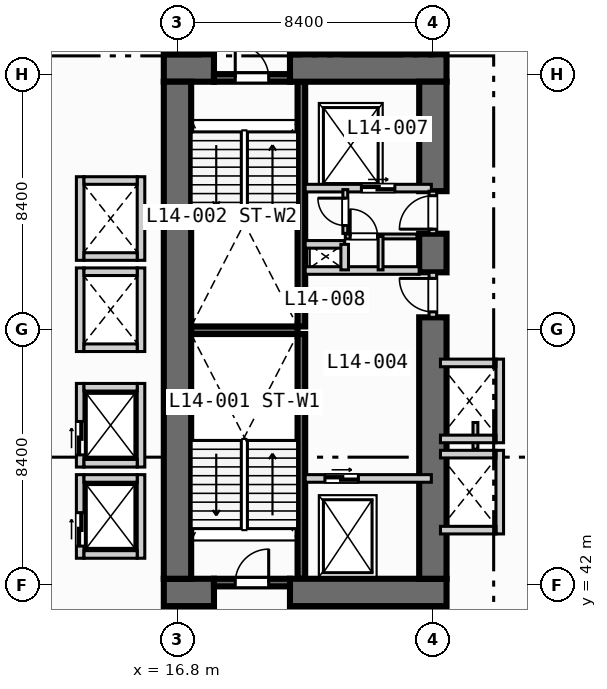
"""IFC4 building model, lengths in metres.
Left out: names, types, materials, properties, quantities, classifications, styles, units other than length and angle.
Written with IfcOpenShell. Run it as: python <this file> out.ifc"""

import sys

from ifc_helpers import new_model, si_unit, direction, frame, frame_2d, origin, place, context, subcontext, project, spatial, rectangle, extrude, element, fill, save


model = new_model("IFC4")
c1 = context("Model", 3, precision=1e-05, world=origin(), true_north=direction((0.0, 1.0)))
c2 = subcontext(c1, "Body", "Model", "MODEL_VIEW")
j1 = project(units=[si_unit("LENGTHUNIT", "METRE"), si_unit("PLANEANGLEUNIT", "RADIAN")], contexts=[c1])
p1 = place(None, origin())
s1 = spatial("IfcSite", under=j1, at=p1, CompositionType="ELEMENT")
p2 = place(p1, origin())
s2 = spatial("IfcBuilding", under=s1, at=p2, CompositionType="ELEMENT")
p3 = place(p2, frame((0.0, 0.0, 62.4)))
s3 = spatial("IfcBuildingStorey", under=s2, at=p3, CompositionType="ELEMENT", Elevation=62.4)
for number, where, z_axis, x_axis in (
    (1, (20.875, 42.2, 0.0), (0.0, 0.0, 1.0), (0.0, 1.0, 0.0)),
    (2, (20.875, 50.5, 0.0), (0.0, 0.0, 1.0), (0.0, 1.0, 0.0)),
):
    element("IfcWall", number, at=place(p3, frame(where, z_axis=z_axis, x_axis=x_axis)), inside=s3, PredefinedType="SOLIDWALL", context=c2, shape_type="SweptSolid", body=[
        extrude(rectangle(XDim=8.05, YDim=0.25, at=frame_2d((4.025, 0.0))), origin(), (0.0, 0.0, 1.0), 3.55),
    ])
p4 = place(p3, frame((17.25, 50.375, 0.0), z_axis=(0.0, 0.0, 1.0), x_axis=(1.0, 0.0, 0.0)))
e3 = element("IfcWall", 3, at=p4, inside=s3, PredefinedType="SOLIDWALL", context=c2, shape_type="SweptSolid", body=[
    extrude(rectangle(XDim=3.5, YDim=0.25, at=frame_2d((1.75, 0.0))), origin(), (0.0, 0.0, 1.0), 3.55),
])
p5 = place(p3, frame((16.35, 41.75, 0.0), z_axis=(0.0, 0.0, 1.0), x_axis=(1.0, 0.0, 0.0)))
e4 = element("IfcWall", 4, at=p5, inside=s3, PredefinedType="SHEAR", context=c2, shape_type="SweptSolid", body=[
    extrude(rectangle(XDim=1.65, YDim=0.9, at=frame_2d((0.825, 0.0))), origin(), (0.0, 0.0, 1.0), 3.55),
])
p6 = place(p3, frame((20.5, 41.75, 0.0), z_axis=(0.0, 0.0, 1.0), x_axis=(1.0, 0.0, 0.0)))
e5 = element("IfcWall", 5, at=p6, inside=s3, PredefinedType="SHEAR", context=c2, shape_type="SweptSolid", body=[
    extrude(rectangle(XDim=5.15, YDim=0.9, at=frame_2d((2.575, 0.0))), origin(), (0.0, 0.0, 1.0), 3.55),
])
p7 = place(p3, frame((16.35, 59.0, 0.0), z_axis=(0.0, 0.0, 1.0), x_axis=(1.0, 0.0, 0.0)))
e6 = element("IfcWall", 6, at=p7, inside=s3, PredefinedType="SHEAR", context=c2, shape_type="SweptSolid", body=[
    extrude(rectangle(XDim=1.65, YDim=0.9, at=frame_2d((0.825, 0.0))), origin(), (0.0, 0.0, 1.0), 3.55),
])
p8 = place(p3, frame((20.5, 59.0, 0.0), z_axis=(0.0, 0.0, 1.0), x_axis=(1.0, 0.0, 0.0)))
e7 = element("IfcWall", 7, at=p8, inside=s3, PredefinedType="SHEAR", context=c2, shape_type="SweptSolid", body=[
    extrude(rectangle(XDim=5.15, YDim=0.9, at=frame_2d((2.575, 0.0))), origin(), (0.0, 0.0, 1.0), 3.55),
])
p9 = place(p3, frame((16.8, 42.2, 0.0), z_axis=(0.0, 0.0, 1.0), x_axis=(0.0, 1.0, 0.0)))
e8 = element("IfcWall", 8, at=p9, inside=s3, PredefinedType="SHEAR", context=c2, shape_type="SweptSolid", body=[
    extrude(rectangle(XDim=16.35, YDim=0.9, at=frame_2d((8.175, 0.0))), origin(), (0.0, 0.0, 1.0), 3.55),
])
p10 = place(p3, frame((25.2, 42.2, 0.0), z_axis=(0.0, 0.0, 1.0), x_axis=(0.0, 1.0, 0.0)))
e9 = element("IfcWall", 9, at=p10, inside=s3, PredefinedType="SHEAR", context=c2, shape_type="SweptSolid", body=[
    extrude(rectangle(XDim=8.6, YDim=0.9, at=frame_2d((4.3, 0.0))), origin(), (0.0, 0.0, 1.0), 3.55),
])
p11 = place(p3, frame((25.2, 52.28, 0.0), z_axis=(0.0, 0.0, 1.0), x_axis=(0.0, 1.0, 0.0)))
e10 = element("IfcWall", 10, at=p11, inside=s3, PredefinedType="SHEAR", context=c2, shape_type="SweptSolid", body=[
    extrude(rectangle(XDim=1.27, YDim=0.9, at=frame_2d((0.635, 0.0))), origin(), (0.0, 0.0, 1.0), 3.55),
])
p12 = place(p3, frame((25.2, 54.95, 0.0), z_axis=(0.0, 0.0, 1.0), x_axis=(0.0, 1.0, 0.0)))
e11 = element("IfcWall", 11, at=p12, inside=s3, PredefinedType="SHEAR", context=c2, shape_type="SweptSolid", body=[
    extrude(rectangle(XDim=3.6, YDim=0.9, at=frame_2d((1.8, 0.0))), origin(), (0.0, 0.0, 1.0), 3.55),
])
p13 = place(p3, frame((18.0, 42.075, 0.0), z_axis=(0.0, 0.0, 1.0), x_axis=(1.0, 0.0, 0.0)))
e12 = element("IfcWall", 12, at=p13, inside=s3, PredefinedType="SOLIDWALL", context=c2, shape_type="SweptSolid", body=[
    extrude(rectangle(XDim=2.5, YDim=0.25, at=frame_2d((1.25, 0.0))), origin(), (0.0, 0.0, 1.0), 3.55),
])
p14 = place(p13, frame((0.7, 0.0, 0.0)))
e13 = element("IfcOpeningElement", 13, at=p14, cuts=e12, PredefinedType="OPENING", context=c2, shape_type="SweptSolid", body=[
    extrude(rectangle(XDim=1.1, YDim=2.15, at=frame_2d((0.55, 1.075))), frame((0.0, 0.135, 0.0), z_axis=(0.0, -1.0, 0.0), x_axis=(1.0, 0.0, 0.0)), (0.0, 0.0, 1.0), 0.27),
])
p15 = place(p3, frame((18.0, 58.675, 0.0), z_axis=(0.0, 0.0, 1.0), x_axis=(1.0, 0.0, 0.0)))
e14 = element("IfcWall", 14, at=p15, inside=s3, PredefinedType="SOLIDWALL", context=c2, shape_type="SweptSolid", body=[
    extrude(rectangle(XDim=2.5, YDim=0.25, at=frame_2d((1.25, 0.0))), origin(), (0.0, 0.0, 1.0), 3.55),
])
p16 = place(p15, frame((0.7, 0.0, 0.0)))
e15 = element("IfcOpeningElement", 15, at=p16, cuts=e14, PredefinedType="OPENING", context=c2, shape_type="SweptSolid", body=[
    extrude(rectangle(XDim=1.1, YDim=2.15, at=frame_2d((0.55, 1.075))), frame((0.0, 0.135, 0.0), z_axis=(0.0, -1.0, 0.0), x_axis=(1.0, 0.0, 0.0)), (0.0, 0.0, 1.0), 0.27),
])
p17 = place(p3, frame((21.0, 45.5, 0.0), z_axis=(0.0, 0.0, 1.0), x_axis=(1.0, 0.0, 0.0)))
e16 = element("IfcWall", 16, at=p17, inside=s3, PredefinedType="SOLIDWALL", context=c2, shape_type="SweptSolid", body=[
    extrude(rectangle(XDim=4.15, YDim=0.25, at=frame_2d((2.075, 0.0))), origin(), (0.0, 0.0, 1.0), 3.55),
])
p18 = place(p17, frame((0.65, 0.0, 0.0)))
e17 = element("IfcOpeningElement", 17, at=p18, cuts=e16, PredefinedType="OPENING", context=c2, shape_type="SweptSolid", body=[
    extrude(rectangle(XDim=1.1, YDim=2.15, at=frame_2d((0.55, 1.075))), frame((0.0, 0.135, 0.0), z_axis=(0.0, -1.0, 0.0), x_axis=(1.0, 0.0, 0.0)), (0.0, 0.0, 1.0), 0.27),
])
p19 = place(p3, frame((25.2, 50.8, 0.0), z_axis=(0.0, 0.0, 1.0), x_axis=(0.0, 1.0, 0.0)))
e18 = element("IfcWall", 18, at=p19, inside=s3, PredefinedType="SOLIDWALL", context=c2, shape_type="SweptSolid", body=[
    extrude(rectangle(XDim=1.48, YDim=0.25, at=frame_2d((0.74, 0.0))), origin(), (0.0, 0.0, 1.0), 3.55),
])
p20 = place(p19, frame((0.18, 0.0, 0.0)))
e19 = element("IfcOpeningElement", 19, at=p20, cuts=e18, PredefinedType="OPENING", context=c2, shape_type="SweptSolid", body=[
    extrude(rectangle(XDim=1.1, YDim=2.15, at=frame_2d((0.55, 1.075))), frame((0.0, 0.135, 0.0), z_axis=(0.0, -1.0, 0.0), x_axis=(1.0, 0.0, 0.0)), (0.0, 0.0, 1.0), 0.27),
])
p21 = place(p3, frame((21.0, 52.34, 0.0), z_axis=(0.0, 0.0, 1.0), x_axis=(1.0, 0.0, 0.0)))
e20 = element("IfcWall", 20, at=p21, inside=s3, PredefinedType="SOLIDWALL", context=c2, shape_type="SweptSolid", body=[
    extrude(rectangle(XDim=3.75, YDim=0.25, at=frame_2d((1.875, 0.0))), origin(), (0.0, 0.0, 1.0), 3.55),
])
p22 = place(p3, frame((21.0, 55.05, 0.0), z_axis=(0.0, 0.0, 1.0), x_axis=(1.0, 0.0, 0.0)))
e21 = element("IfcWall", 21, at=p22, inside=s3, PredefinedType="SOLIDWALL", context=c2, shape_type="SweptSolid", body=[
    extrude(rectangle(XDim=4.15, YDim=0.25, at=frame_2d((2.075, 0.0))), origin(), (0.0, 0.0, 1.0), 3.55),
])
p23 = place(p22, frame((1.85, 0.0, 0.0)))
e22 = element("IfcOpeningElement", 22, at=p23, cuts=e21, PredefinedType="OPENING", context=c2, shape_type="SweptSolid", body=[
    extrude(rectangle(XDim=1.1, YDim=2.15, at=frame_2d((0.55, 1.075))), frame((0.0, 0.135, 0.0), z_axis=(0.0, -1.0, 0.0), x_axis=(1.0, 0.0, 0.0)), (0.0, 0.0, 1.0), 0.27),
])
p24 = place(p3, frame((25.2, 53.55, 0.0), z_axis=(0.0, 0.0, 1.0), x_axis=(0.0, 1.0, 0.0)))
e23 = element("IfcWall", 23, at=p24, inside=s3, PredefinedType="SOLIDWALL", context=c2, shape_type="SweptSolid", body=[
    extrude(rectangle(XDim=1.4, YDim=0.25, at=frame_2d((0.7, 0.0))), origin(), (0.0, 0.0, 1.0), 3.55),
])
p25 = place(p24, frame((0.15, 0.0, 0.0)))
e24 = element("IfcOpeningElement", 24, at=p25, cuts=e23, PredefinedType="OPENING", context=c2, shape_type="SweptSolid", body=[
    extrude(rectangle(XDim=1.1, YDim=2.15, at=frame_2d((0.55, 1.075))), frame((0.0, 0.135, 0.0), z_axis=(0.0, -1.0, 0.0), x_axis=(1.0, 0.0, 0.0)), (0.0, 0.0, 1.0), 0.27),
])
p26 = place(p3, frame((21.0, 53.2, 0.0), z_axis=(0.0, 0.0, 1.0), x_axis=(1.0, 0.0, 0.0)))
e25 = element("IfcWall", 25, at=p26, inside=s3, PredefinedType="SOLIDWALL", context=c2, shape_type="SweptSolid", body=[
    extrude(rectangle(XDim=1.3, YDim=0.25, at=frame_2d((0.65, 0.0))), origin(), (0.0, 0.0, 1.0), 3.55),
])
p27 = place(p3, frame((22.3, 52.36, 0.0), z_axis=(0.0, 0.0, 1.0), x_axis=(0.0, 1.0, 0.0)))
e26 = element("IfcWall", 26, at=p27, inside=s3, PredefinedType="SOLIDWALL", context=c2, shape_type="SweptSolid", body=[
    extrude(rectangle(XDim=0.84, YDim=0.25, at=frame_2d((0.42, 0.0))), origin(), (0.0, 0.0, 1.0), 3.55),
])
p28 = place(p3, frame((22.32, 53.56, 0.0), z_axis=(0.0, 0.0, 1.0), x_axis=(0.0, 1.0, 0.0)))
e27 = element("IfcWall", 27, at=p28, inside=s3, PredefinedType="PARTITIONING", context=c2, shape_type="SweptSolid", body=[
    extrude(rectangle(XDim=1.44, YDim=0.16, at=frame_2d((0.72, 0.0))), origin(), (0.0, 0.0, 1.0), 3.55),
])
p29 = place(p28, frame((0.26, 0.0, 0.0)))
e28 = element("IfcOpeningElement", 28, at=p29, cuts=e27, PredefinedType="OPENING", context=c2, shape_type="SweptSolid", body=[
    extrude(rectangle(XDim=0.9, YDim=2.1, at=frame_2d((0.45, 1.05))), frame((0.0, 0.09, 0.0), z_axis=(0.0, -1.0, 0.0), x_axis=(1.0, 0.0, 0.0)), (0.0, 0.0, 1.0), 0.18),
])
p30 = place(p3, frame((22.32, 53.46, 0.0), z_axis=(0.0, 0.0, 1.0), x_axis=(1.0, 0.0, 0.0)))
e29 = element("IfcWall", 29, at=p30, inside=s3, PredefinedType="PARTITIONING", context=c2, shape_type="SweptSolid", body=[
    extrude(rectangle(XDim=2.36, YDim=0.16, at=frame_2d((1.18, 0.0))), origin(), (0.0, 0.0, 1.0), 3.55),
])
p31 = place(p30, frame((0.16, 0.0, 0.0)))
e30 = element("IfcOpeningElement", 30, at=p31, cuts=e29, PredefinedType="OPENING", context=c2, shape_type="SweptSolid", body=[
    extrude(rectangle(XDim=0.9, YDim=2.1, at=frame_2d((0.45, 1.05))), frame((0.0, 0.09, 0.0), z_axis=(0.0, -1.0, 0.0), x_axis=(1.0, 0.0, 0.0)), (0.0, 0.0, 1.0), 0.18),
])
p32 = place(p3, frame((23.48, 52.36, 0.0), z_axis=(0.0, 0.0, 1.0), x_axis=(0.0, 1.0, 0.0)))
e31 = element("IfcWall", 31, at=p32, inside=s3, PredefinedType="PARTITIONING", context=c2, shape_type="SweptSolid", body=[
    extrude(rectangle(XDim=1.1, YDim=0.16, at=frame_2d((0.55, 0.0))), origin(), (0.0, 0.0, 1.0), 3.55),
])
p33 = place(p3, frame((13.6, 42.875, 0.0), z_axis=(0.0, 0.0, 1.0), x_axis=(0.0, 1.0, 0.0)))
e32 = element("IfcWall", 32, at=p33, inside=s3, PredefinedType="SOLIDWALL", context=c2, shape_type="SweptSolid", body=[
    extrude(rectangle(XDim=2.75, YDim=0.25, at=frame_2d((1.375, 0.0))), origin(), (0.0, 0.0, 1.0), 3.55),
])
p34 = place(p33, frame((0.4, 0.0, 0.0)))
e33 = element("IfcOpeningElement", 33, at=p34, cuts=e32, PredefinedType="OPENING", context=c2, shape_type="SweptSolid", body=[
    extrude(rectangle(XDim=1.1, YDim=2.15, at=frame_2d((0.55, 1.075))), frame((0.0, 0.135, 0.0), z_axis=(0.0, -1.0, 0.0), x_axis=(1.0, 0.0, 0.0)), (0.0, 0.0, 1.0), 0.27),
])
p35 = place(p3, frame((15.6, 42.875, 0.0), z_axis=(0.0, 0.0, 1.0), x_axis=(0.0, 1.0, 0.0)))
e34 = element("IfcWall", 34, at=p35, inside=s3, PredefinedType="SOLIDWALL", context=c2, shape_type="SweptSolid", body=[
    extrude(rectangle(XDim=2.75, YDim=0.25, at=frame_2d((1.375, 0.0))), origin(), (0.0, 0.0, 1.0), 3.55),
])
for number, where, z_axis, x_axis in (
    (35, (13.725, 43.0, 0.0), (0.0, 0.0, 1.0), (1.0, 0.0, 0.0)),
    (36, (13.725, 45.5, 0.0), (0.0, 0.0, 1.0), (1.0, 0.0, 0.0)),
):
    element("IfcWall", number, at=place(p3, frame(where, z_axis=z_axis, x_axis=x_axis)), inside=s3, PredefinedType="SOLIDWALL", context=c2, shape_type="SweptSolid", body=[
        extrude(rectangle(XDim=1.75, YDim=0.25, at=frame_2d((0.875, 0.0))), origin(), (0.0, 0.0, 1.0), 3.55),
    ])
p36 = place(p3, frame((13.6, 45.875, 0.0), z_axis=(0.0, 0.0, 1.0), x_axis=(0.0, 1.0, 0.0)))
e37 = element("IfcWall", 37, at=p36, inside=s3, PredefinedType="SOLIDWALL", context=c2, shape_type="SweptSolid", body=[
    extrude(rectangle(XDim=2.75, YDim=0.25, at=frame_2d((1.375, 0.0))), origin(), (0.0, 0.0, 1.0), 3.55),
])
p37 = place(p36, frame((0.4, 0.0, 0.0)))
e38 = element("IfcOpeningElement", 38, at=p37, cuts=e37, PredefinedType="OPENING", context=c2, shape_type="SweptSolid", body=[
    extrude(rectangle(XDim=1.1, YDim=2.15, at=frame_2d((0.55, 1.075))), frame((0.0, 0.135, 0.0), z_axis=(0.0, -1.0, 0.0), x_axis=(1.0, 0.0, 0.0)), (0.0, 0.0, 1.0), 0.27),
])
p38 = place(p3, frame((15.6, 45.875, 0.0), z_axis=(0.0, 0.0, 1.0), x_axis=(0.0, 1.0, 0.0)))
e39 = element("IfcWall", 39, at=p38, inside=s3, PredefinedType="SOLIDWALL", context=c2, shape_type="SweptSolid", body=[
    extrude(rectangle(XDim=2.75, YDim=0.25, at=frame_2d((1.375, 0.0))), origin(), (0.0, 0.0, 1.0), 3.55),
])
for number, where, z_axis, x_axis in (
    (40, (13.725, 46.0, 0.0), (0.0, 0.0, 1.0), (1.0, 0.0, 0.0)),
    (41, (13.725, 48.5, 0.0), (0.0, 0.0, 1.0), (1.0, 0.0, 0.0)),
):
    element("IfcWall", number, at=place(p3, frame(where, z_axis=z_axis, x_axis=x_axis)), inside=s3, PredefinedType="SOLIDWALL", context=c2, shape_type="SweptSolid", body=[
        extrude(rectangle(XDim=1.75, YDim=0.25, at=frame_2d((0.875, 0.0))), origin(), (0.0, 0.0, 1.0), 3.55),
    ])
for number, where, z_axis, x_axis in (
    (42, (13.6, 49.675, 0.0), (0.0, 0.0, 1.0), (0.0, 1.0, 0.0)),
    (43, (15.6, 49.675, 0.0), (0.0, 0.0, 1.0), (0.0, 1.0, 0.0)),
):
    element("IfcWall", number, at=place(p3, frame(where, z_axis=z_axis, x_axis=x_axis)), inside=s3, PredefinedType="SOLIDWALL", context=c2, shape_type="SweptSolid", body=[
        extrude(rectangle(XDim=2.75, YDim=0.25, at=frame_2d((1.375, 0.0))), origin(), (0.0, 0.0, 1.0), 3.55),
    ])
for number, where, z_axis, x_axis in (
    (44, (13.725, 49.8, 0.0), (0.0, 0.0, 1.0), (1.0, 0.0, 0.0)),
    (45, (13.725, 52.3, 0.0), (0.0, 0.0, 1.0), (1.0, 0.0, 0.0)),
):
    element("IfcWall", number, at=place(p3, frame(where, z_axis=z_axis, x_axis=x_axis)), inside=s3, PredefinedType="SOLIDWALL", context=c2, shape_type="SweptSolid", body=[
        extrude(rectangle(XDim=1.75, YDim=0.25, at=frame_2d((0.875, 0.0))), origin(), (0.0, 0.0, 1.0), 3.55),
    ])
for number, where, z_axis, x_axis in (
    (46, (13.6, 52.675, 0.0), (0.0, 0.0, 1.0), (0.0, 1.0, 0.0)),
    (47, (15.6, 52.675, 0.0), (0.0, 0.0, 1.0), (0.0, 1.0, 0.0)),
):
    element("IfcWall", number, at=place(p3, frame(where, z_axis=z_axis, x_axis=x_axis)), inside=s3, PredefinedType="SOLIDWALL", context=c2, shape_type="SweptSolid", body=[
        extrude(rectangle(XDim=2.75, YDim=0.25, at=frame_2d((1.375, 0.0))), origin(), (0.0, 0.0, 1.0), 3.55),
    ])
for number, where, z_axis, x_axis in (
    (48, (13.725, 52.8, 0.0), (0.0, 0.0, 1.0), (1.0, 0.0, 0.0)),
    (49, (13.725, 55.3, 0.0), (0.0, 0.0, 1.0), (1.0, 0.0, 0.0)),
):
    element("IfcWall", number, at=place(p3, frame(where, z_axis=z_axis, x_axis=x_axis)), inside=s3, PredefinedType="SOLIDWALL", context=c2, shape_type="SweptSolid", body=[
        extrude(rectangle(XDim=1.75, YDim=0.25, at=frame_2d((0.875, 0.0))), origin(), (0.0, 0.0, 1.0), 3.55),
    ])
p39 = place(p3, frame((27.4, 43.675, 0.0), z_axis=(0.0, 0.0, 1.0), x_axis=(0.0, 1.0, 0.0)))
e50 = element("IfcWall", 50, at=p39, inside=s3, PredefinedType="SOLIDWALL", context=c2, shape_type="SweptSolid", body=[
    extrude(rectangle(XDim=2.75, YDim=0.25, at=frame_2d((1.375, 0.0))), origin(), (0.0, 0.0, 1.0), 3.55),
])
for number, where, z_axis, x_axis in (
    (51, (25.45, 43.8, 0.0), (0.0, 0.0, 1.0), (1.0, 0.0, 0.0)),
    (52, (25.45, 46.3, 0.0), (0.0, 0.0, 1.0), (1.0, 0.0, 0.0)),
):
    element("IfcWall", number, at=place(p3, frame(where, z_axis=z_axis, x_axis=x_axis)), inside=s3, PredefinedType="SOLIDWALL", context=c2, shape_type="SweptSolid", body=[
        extrude(rectangle(XDim=1.825, YDim=0.25, at=frame_2d((0.913, 0.0))), origin(), (0.0, 0.0, 1.0), 3.55),
    ])
p40 = place(p3, frame((26.6, 46.46, 0.0), z_axis=(0.0, 0.0, 1.0), x_axis=(0.0, 1.0, 0.0)))
e53 = element("IfcWall", 53, at=p40, inside=s3, PredefinedType="PARTITIONING", context=c2, shape_type="SweptSolid", body=[
    extrude(rectangle(XDim=0.88, YDim=0.16, at=frame_2d((0.44, 0.0))), origin(), (0.0, 0.0, 1.0), 3.55),
])
p41 = place(p3, frame((27.4, 46.675, 0.0), z_axis=(0.0, 0.0, 1.0), x_axis=(0.0, 1.0, 0.0)))
e54 = element("IfcWall", 54, at=p41, inside=s3, PredefinedType="SOLIDWALL", context=c2, shape_type="SweptSolid", body=[
    extrude(rectangle(XDim=2.75, YDim=0.25, at=frame_2d((1.375, 0.0))), origin(), (0.0, 0.0, 1.0), 3.55),
])
for number, where, z_axis, x_axis in (
    (55, (25.45, 46.8, 0.0), (0.0, 0.0, 1.0), (1.0, 0.0, 0.0)),
    (56, (25.45, 49.3, 0.0), (0.0, 0.0, 1.0), (1.0, 0.0, 0.0)),
):
    element("IfcWall", number, at=place(p3, frame(where, z_axis=z_axis, x_axis=x_axis)), inside=s3, PredefinedType="SOLIDWALL", context=c2, shape_type="SweptSolid", body=[
        extrude(rectangle(XDim=1.825, YDim=0.25, at=frame_2d((0.913, 0.0))), origin(), (0.0, 0.0, 1.0), 3.55),
    ])
p42 = place(p14, origin())
e57 = element("IfcDoor", 57, at=p42, inside=s3, OperationType="SINGLE_SWING_RIGHT", PredefinedType="DOOR", context=c2, shape_type="SweptSolid", body=[
    extrude(rectangle(XDim=1.1, YDim=2.15, at=frame_2d((0.55, 1.075))), frame((0.0, 0.025, 0.0), z_axis=(0.0, -1.0, 0.0), x_axis=(1.0, 0.0, 0.0)), (0.0, 0.0, 1.0), 0.05),
])
fill(e13, e57)
p43 = place(p16, origin())
e58 = element("IfcDoor", 58, at=p43, inside=s3, OperationType="SINGLE_SWING_LEFT", PredefinedType="DOOR", context=c2, shape_type="SweptSolid", body=[
    extrude(rectangle(XDim=1.1, YDim=2.15, at=frame_2d((0.55, 1.075))), frame((0.0, 0.025, 0.0), z_axis=(0.0, -1.0, 0.0), x_axis=(1.0, 0.0, 0.0)), (0.0, 0.0, 1.0), 0.05),
])
fill(e15, e58)
p44 = place(p18, origin())
e59 = element("IfcDoor", 59, at=p44, inside=s3, OperationType="SLIDING_TO_LEFT", PredefinedType="DOOR", context=c2, shape_type="SweptSolid", body=[
    extrude(rectangle(XDim=1.1, YDim=2.15, at=frame_2d((0.55, 1.075))), frame((0.0, 0.025, 0.0), z_axis=(0.0, -1.0, 0.0), x_axis=(1.0, 0.0, 0.0)), (0.0, 0.0, 1.0), 0.05),
])
fill(e17, e59)
p45 = place(p20, origin())
e60 = element("IfcDoor", 60, at=p45, inside=s3, OperationType="SINGLE_SWING_RIGHT", PredefinedType="DOOR", context=c2, shape_type="SweptSolid", body=[
    extrude(rectangle(XDim=1.1, YDim=2.15, at=frame_2d((0.55, 1.075))), frame((0.0, 0.025, 0.0), z_axis=(0.0, -1.0, 0.0), x_axis=(1.0, 0.0, 0.0)), (0.0, 0.0, 1.0), 0.05),
])
fill(e19, e60)
p46 = place(p23, origin())
e61 = element("IfcDoor", 61, at=p46, inside=s3, OperationType="SLIDING_TO_LEFT", PredefinedType="DOOR", context=c2, shape_type="SweptSolid", body=[
    extrude(rectangle(XDim=1.1, YDim=2.15, at=frame_2d((0.55, 1.075))), frame((0.0, 0.025, 0.0), z_axis=(0.0, -1.0, 0.0), x_axis=(1.0, 0.0, 0.0)), (0.0, 0.0, 1.0), 0.05),
])
fill(e22, e61)
p47 = place(p25, origin())
e62 = element("IfcDoor", 62, at=p47, inside=s3, OperationType="SINGLE_SWING_LEFT", PredefinedType="DOOR", context=c2, shape_type="SweptSolid", body=[
    extrude(rectangle(XDim=1.1, YDim=2.15, at=frame_2d((0.55, 1.075))), frame((0.0, 0.025, 0.0), z_axis=(0.0, -1.0, 0.0), x_axis=(1.0, 0.0, 0.0)), (0.0, 0.0, 1.0), 0.05),
])
fill(e24, e62)
p48 = place(p29, origin())
e63 = element("IfcDoor", 63, at=p48, inside=s3, OperationType="SINGLE_SWING_RIGHT", PredefinedType="DOOR", context=c2, shape_type="SweptSolid", body=[
    extrude(rectangle(XDim=0.9, YDim=2.1, at=frame_2d((0.45, 1.05))), frame((0.0, 0.025, 0.0), z_axis=(0.0, -1.0, 0.0), x_axis=(1.0, 0.0, 0.0)), (0.0, 0.0, 1.0), 0.05),
])
fill(e28, e63)
p49 = place(p31, origin())
e64 = element("IfcDoor", 64, at=p49, inside=s3, OperationType="SINGLE_SWING_LEFT", PredefinedType="DOOR", context=c2, shape_type="SweptSolid", body=[
    extrude(rectangle(XDim=0.9, YDim=2.1, at=frame_2d((0.45, 1.05))), frame((0.0, 0.025, 0.0), z_axis=(0.0, -1.0, 0.0), x_axis=(1.0, 0.0, 0.0)), (0.0, 0.0, 1.0), 0.05),
])
fill(e30, e64)
p50 = place(p34, origin())
e65 = element("IfcDoor", 65, at=p50, inside=s3, OperationType="SLIDING_TO_LEFT", PredefinedType="DOOR", context=c2, shape_type="SweptSolid", body=[
    extrude(rectangle(XDim=1.1, YDim=2.15, at=frame_2d((0.55, 1.075))), frame((0.0, 0.025, 0.0), z_axis=(0.0, -1.0, 0.0), x_axis=(1.0, 0.0, 0.0)), (0.0, 0.0, 1.0), 0.05),
])
fill(e33, e65)
p51 = place(p37, origin())
e66 = element("IfcDoor", 66, at=p51, inside=s3, OperationType="SLIDING_TO_LEFT", PredefinedType="DOOR", context=c2, shape_type="SweptSolid", body=[
    extrude(rectangle(XDim=1.1, YDim=2.15, at=frame_2d((0.55, 1.075))), frame((0.0, 0.025, 0.0), z_axis=(0.0, -1.0, 0.0), x_axis=(1.0, 0.0, 0.0)), (0.0, 0.0, 1.0), 0.05),
])
fill(e38, e66)
save(model, sys.argv[1])
